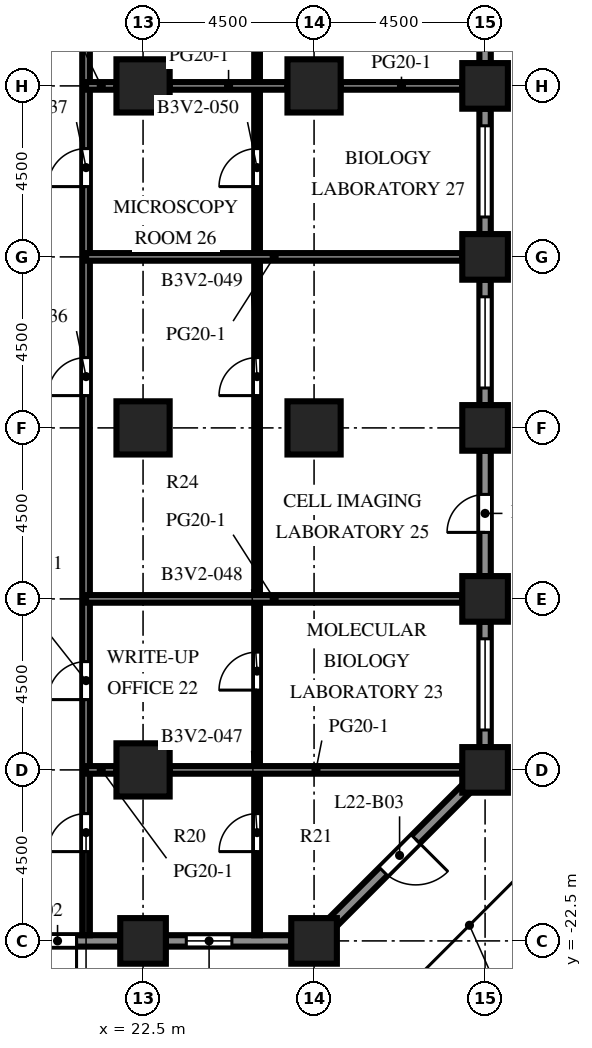
"""IFC4 building model, lengths in metres.
Left out: names, types, materials, properties, quantities, classifications, styles, units other than length and angle.
Written with IfcOpenShell. Run it as: python <this file> out.ifc"""

import sys

from ifc_helpers import new_model, si_unit, direction, frame, frame_2d, origin, origin_2d, place, context, subcontext, project, spatial, rectangle, extrude, element, fill, save


model = new_model("IFC4")
c1 = context("Model", 3, precision=1e-05, world=origin(), true_north=direction((0.0, 1.0)))
c2 = subcontext(c1, "Body", "Model", "MODEL_VIEW")
j1 = project(units=[si_unit("LENGTHUNIT", "METRE"), si_unit("PLANEANGLEUNIT", "RADIAN")], contexts=[c1])
p1 = place(None, origin())
s1 = spatial("IfcSite", under=j1, at=p1, CompositionType="ELEMENT")
p2 = place(p1, origin())
s2 = spatial("IfcBuilding", under=s1, at=p2, CompositionType="ELEMENT")
p3 = place(p2, frame((0.0, 0.0, 98.4)))
s3 = spatial("IfcBuildingStorey", under=s2, at=p3, CompositionType="ELEMENT", Elevation=98.4)
for number, where, z_axis, x_axis in (
    (1, (22.5, -22.5, 0.0), (0.0, 0.0, 1.0), (1.0, 0.0, 0.0)),
    (2, (27.0, -22.5, 0.0), (0.0, 0.0, 1.0), (1.0, 0.0, 0.0)),
    (3, (31.5, -18.0, 0.0), (0.0, 0.0, 1.0), (1.0, 0.0, 0.0)),
    (4, (31.5, -13.5, 0.0), (0.0, 0.0, 1.0), (1.0, 0.0, 0.0)),
    (5, (31.5, -9.0, 0.0), (0.0, 0.0, 1.0), (1.0, 0.0, 0.0)),
    (6, (31.5, -4.5, 0.0), (0.0, 0.0, 1.0), (1.0, 0.0, 0.0)),
    (7, (31.5, 0.0, 0.0), (0.0, 0.0, 1.0), (1.0, 0.0, 0.0)),
):
    element("IfcColumn", number, at=place(p3, frame(where, z_axis=z_axis, x_axis=x_axis)), inside=s3, PredefinedType="COLUMN", context=c2, shape_type="SweptSolid", body=[
        extrude(rectangle(XDim=1.2, YDim=1.2, at=origin_2d()), origin(), (0.0, 0.0, 1.0), 4.1),
    ])
for number, where, z_axis, x_axis in (
    (8, (22.5, -18.0, 0.0), (0.0, 0.0, 1.0), (1.0, 0.0, 0.0)),
    (9, (22.5, -9.0, 0.0), (0.0, 0.0, 1.0), (1.0, 0.0, 0.0)),
    (10, (22.5, 0.0, 0.0), (0.0, 0.0, 1.0), (1.0, 0.0, 0.0)),
    (11, (27.0, -9.0, 0.0), (0.0, 0.0, 1.0), (1.0, 0.0, 0.0)),
    (12, (27.0, 0.0, 0.0), (0.0, 0.0, 1.0), (1.0, 0.0, 0.0)),
):
    element("IfcColumn", number, at=place(p3, frame(where, z_axis=z_axis, x_axis=x_axis)), inside=s3, PredefinedType="COLUMN", context=c2, shape_type="SweptSolid", body=[
        extrude(rectangle(XDim=1.4, YDim=1.4, at=origin_2d()), origin(), (0.0, 0.0, 1.0), 4.1),
    ])
p4 = place(p3, frame((21.9, -22.5, 0.0), z_axis=(0.0, 0.0, 1.0), x_axis=(-1.0, 0.0, 0.0)))
e13 = element("IfcWall", 13, at=p4, inside=s3, PredefinedType="SOLIDWALL", context=c2, shape_type="SweptSolid", body=[
    extrude(rectangle(XDim=3.3, YDim=0.3, at=frame_2d((1.65, 0.0))), origin(), (0.0, 0.0, 1.0), 2.75),
])
p5 = place(p4, frame((1.15, 0.0, 0.0)))
e14 = element("IfcOpeningElement", 14, at=p5, cuts=e13, PredefinedType="OPENING", context=c2, shape_type="SweptSolid", body=[
    extrude(rectangle(XDim=1.0, YDim=2.2, at=frame_2d((0.5, 1.1))), frame((0.0, 0.16, 0.0), z_axis=(0.0, -1.0, 0.0), x_axis=(1.0, 0.0, 0.0)), (0.0, 0.0, 1.0), 0.32),
])
p6 = place(p3, frame((26.4, -22.5, 0.0), z_axis=(0.0, 0.0, 1.0), x_axis=(-1.0, 0.0, 0.0)))
e15 = element("IfcWall", 15, at=p6, inside=s3, PredefinedType="SOLIDWALL", context=c2, shape_type="SweptSolid", body=[
    extrude(rectangle(XDim=3.3, YDim=0.3, at=frame_2d((1.65, 0.0))), origin(), (0.0, 0.0, 1.0), 2.75),
])
p7 = place(p6, frame((1.562, 0.0, 0.8)))
e16 = element("IfcOpeningElement", 16, at=p7, cuts=e15, PredefinedType="OPENING", context=c2, shape_type="SweptSolid", body=[
    extrude(rectangle(XDim=1.2, YDim=1.7, at=frame_2d((0.6, 0.85))), frame((0.0, 0.16, 0.0), z_axis=(0.0, -1.0, 0.0), x_axis=(1.0, 0.0, 0.0)), (0.0, 0.0, 1.0), 0.32),
])
p8 = place(p3, frame((31.006, -18.494, 0.0), z_axis=(0.0, 0.0, 1.0), x_axis=(-0.707106781187, -0.707106781187, 0.0)))
e17 = element("IfcWall", 17, at=p8, inside=s3, PredefinedType="SOLIDWALL", context=c2, shape_type="SweptSolid", body=[
    extrude(rectangle(XDim=4.967, YDim=0.3, at=frame_2d((2.483, 0.0))), origin(), (0.0, 0.0, 1.0), 2.75),
])
p9 = place(p8, frame((1.884, 0.0, 0.0)))
e18 = element("IfcOpeningElement", 18, at=p9, cuts=e17, PredefinedType="OPENING", context=c2, shape_type="SweptSolid", body=[
    extrude(rectangle(XDim=1.2, YDim=2.2, at=frame_2d((0.6, 1.1))), frame((0.0, 0.16, 0.0), z_axis=(0.0, -1.0, 0.0), x_axis=(1.0, 0.0, 0.0)), (0.0, 0.0, 1.0), 0.32),
])
p10 = place(p3, frame((31.5, -14.1, 0.0), z_axis=(0.0, 0.0, 1.0), x_axis=(0.0, -1.0, 0.0)))
e19 = element("IfcWall", 19, at=p10, inside=s3, PredefinedType="SOLIDWALL", context=c2, shape_type="SweptSolid", body=[
    extrude(rectangle(XDim=3.3, YDim=0.3, at=frame_2d((1.65, 0.0))), origin(), (0.0, 0.0, 1.0), 2.75),
])
p11 = place(p10, frame((0.45, 0.0, 0.8)))
e20 = element("IfcOpeningElement", 20, at=p11, cuts=e19, PredefinedType="OPENING", context=c2, shape_type="SweptSolid", body=[
    extrude(rectangle(XDim=2.4, YDim=1.7, at=frame_2d((1.2, 0.85))), frame((0.0, 0.16, 0.0), z_axis=(0.0, -1.0, 0.0), x_axis=(1.0, 0.0, 0.0)), (0.0, 0.0, 1.0), 0.32),
])
p12 = place(p3, frame((31.5, -9.6, 0.0), z_axis=(0.0, 0.0, 1.0), x_axis=(0.0, -1.0, 0.0)))
e21 = element("IfcWall", 21, at=p12, inside=s3, PredefinedType="SOLIDWALL", context=c2, shape_type="SweptSolid", body=[
    extrude(rectangle(XDim=3.3, YDim=0.3, at=frame_2d((1.65, 0.0))), origin(), (0.0, 0.0, 1.0), 2.75),
])
p13 = place(p12, frame((1.15, 0.0, 0.0)))
e22 = element("IfcOpeningElement", 22, at=p13, cuts=e21, PredefinedType="OPENING", context=c2, shape_type="SweptSolid", body=[
    extrude(rectangle(XDim=1.0, YDim=2.2, at=frame_2d((0.5, 1.1))), frame((0.0, 0.16, 0.0), z_axis=(0.0, -1.0, 0.0), x_axis=(1.0, 0.0, 0.0)), (0.0, 0.0, 1.0), 0.32),
])
p14 = place(p3, frame((31.5, -5.1, 0.0), z_axis=(0.0, 0.0, 1.0), x_axis=(0.0, -1.0, 0.0)))
e23 = element("IfcWall", 23, at=p14, inside=s3, PredefinedType="SOLIDWALL", context=c2, shape_type="SweptSolid", body=[
    extrude(rectangle(XDim=3.3, YDim=0.3, at=frame_2d((1.65, 0.0))), origin(), (0.0, 0.0, 1.0), 2.75),
])
p15 = place(p14, frame((0.45, 0.0, 0.8)))
e24 = element("IfcOpeningElement", 24, at=p15, cuts=e23, PredefinedType="OPENING", context=c2, shape_type="SweptSolid", body=[
    extrude(rectangle(XDim=2.4, YDim=1.7, at=frame_2d((1.2, 0.85))), frame((0.0, 0.16, 0.0), z_axis=(0.0, -1.0, 0.0), x_axis=(1.0, 0.0, 0.0)), (0.0, 0.0, 1.0), 0.32),
])
p16 = place(p3, frame((31.5, -0.6, 0.0), z_axis=(0.0, 0.0, 1.0), x_axis=(0.0, -1.0, 0.0)))
e25 = element("IfcWall", 25, at=p16, inside=s3, PredefinedType="SOLIDWALL", context=c2, shape_type="SweptSolid", body=[
    extrude(rectangle(XDim=3.3, YDim=0.3, at=frame_2d((1.65, 0.0))), origin(), (0.0, 0.0, 1.0), 2.75),
])
p17 = place(p16, frame((0.45, 0.0, 0.8)))
e26 = element("IfcOpeningElement", 26, at=p17, cuts=e25, PredefinedType="OPENING", context=c2, shape_type="SweptSolid", body=[
    extrude(rectangle(XDim=2.4, YDim=1.7, at=frame_2d((1.2, 0.85))), frame((0.0, 0.16, 0.0), z_axis=(0.0, -1.0, 0.0), x_axis=(1.0, 0.0, 0.0)), (0.0, 0.0, 1.0), 0.32),
])
p18 = place(p3, frame((31.5, 3.9, 0.0), z_axis=(0.0, 0.0, 1.0), x_axis=(0.0, -1.0, 0.0)))
e27 = element("IfcWall", 27, at=p18, inside=s3, PredefinedType="SOLIDWALL", context=c2, shape_type="SweptSolid", body=[
    extrude(rectangle(XDim=3.3, YDim=0.3, at=frame_2d((1.65, 0.0))), origin(), (0.0, 0.0, 1.0), 2.75),
])
p19 = place(p18, frame((0.45, 0.0, 0.8)))
e28 = element("IfcOpeningElement", 28, at=p19, cuts=e27, PredefinedType="OPENING", context=c2, shape_type="SweptSolid", body=[
    extrude(rectangle(XDim=2.4, YDim=1.7, at=frame_2d((1.2, 0.85))), frame((0.0, 0.16, 0.0), z_axis=(0.0, -1.0, 0.0), x_axis=(1.0, 0.0, 0.0)), (0.0, 0.0, 1.0), 0.32),
])
p20 = place(p3, frame((21.0, 31.35, 0.0), z_axis=(0.0, 0.0, 1.0), x_axis=(0.0, -1.0, 0.0)))
e29 = element("IfcWall", 29, at=p20, inside=s3, PredefinedType="PARTITIONING", context=c2, shape_type="SweptSolid", body=[
    extrude(rectangle(XDim=53.7, YDim=0.2, at=frame_2d((26.85, 0.0))), origin(), (0.0, 0.0, 1.0), 3.65),
])
p21 = place(p20, frame((50.5, 0.0, 0.0)))
e30 = element("IfcOpeningElement", 30, at=p21, cuts=e29, PredefinedType="OPENING", context=c2, shape_type="SweptSolid", body=[
    extrude(rectangle(XDim=1.0, YDim=2.1, at=frame_2d((0.5, 1.05))), frame((0.0, 0.11, 0.0), z_axis=(0.0, -1.0, 0.0), x_axis=(1.0, 0.0, 0.0)), (0.0, 0.0, 1.0), 0.22),
])
p22 = place(p20, frame((46.5, 0.0, 0.0)))
e31 = element("IfcOpeningElement", 31, at=p22, cuts=e29, PredefinedType="OPENING", context=c2, shape_type="SweptSolid", body=[
    extrude(rectangle(XDim=1.0, YDim=2.1, at=frame_2d((0.5, 1.05))), frame((0.0, 0.11, 0.0), z_axis=(0.0, -1.0, 0.0), x_axis=(1.0, 0.0, 0.0)), (0.0, 0.0, 1.0), 0.22),
])
p23 = place(p20, frame((38.5, 0.0, 0.0)))
e32 = element("IfcOpeningElement", 32, at=p23, cuts=e29, PredefinedType="OPENING", context=c2, shape_type="SweptSolid", body=[
    extrude(rectangle(XDim=1.0, YDim=2.1, at=frame_2d((0.5, 1.05))), frame((0.0, 0.11, 0.0), z_axis=(0.0, -1.0, 0.0), x_axis=(1.0, 0.0, 0.0)), (0.0, 0.0, 1.0), 0.22),
])
p24 = place(p20, frame((33.0, 0.0, 0.0)))
e33 = element("IfcOpeningElement", 33, at=p24, cuts=e29, PredefinedType="OPENING", context=c2, shape_type="SweptSolid", body=[
    extrude(rectangle(XDim=1.0, YDim=2.1, at=frame_2d((0.5, 1.05))), frame((0.0, 0.11, 0.0), z_axis=(0.0, -1.0, 0.0), x_axis=(1.0, 0.0, 0.0)), (0.0, 0.0, 1.0), 0.22),
])
p25 = place(p20, frame((23.5, 0.0, 0.0)))
e34 = element("IfcOpeningElement", 34, at=p25, cuts=e29, PredefinedType="OPENING", context=c2, shape_type="SweptSolid", body=[
    extrude(rectangle(XDim=1.0, YDim=2.1, at=frame_2d((0.5, 1.05))), frame((0.0, 0.11, 0.0), z_axis=(0.0, -1.0, 0.0), x_axis=(1.0, 0.0, 0.0)), (0.0, 0.0, 1.0), 0.22),
])
p26 = place(p20, frame((15.75, 0.0, 0.0)))
e35 = element("IfcOpeningElement", 35, at=p26, cuts=e29, PredefinedType="OPENING", context=c2, shape_type="SweptSolid", body=[
    extrude(rectangle(XDim=1.0, YDim=2.1, at=frame_2d((0.5, 1.05))), frame((0.0, 0.11, 0.0), z_axis=(0.0, -1.0, 0.0), x_axis=(1.0, 0.0, 0.0)), (0.0, 0.0, 1.0), 0.22),
])
p27 = place(p20, frame((7.0, 0.0, 0.0)))
e36 = element("IfcOpeningElement", 36, at=p27, cuts=e29, PredefinedType="OPENING", context=c2, shape_type="SweptSolid", body=[
    extrude(rectangle(XDim=1.0, YDim=2.1, at=frame_2d((0.5, 1.05))), frame((0.0, 0.11, 0.0), z_axis=(0.0, -1.0, 0.0), x_axis=(1.0, 0.0, 0.0)), (0.0, 0.0, 1.0), 0.22),
])
p28 = place(p20, frame((1.0, 0.0, 0.0)))
e37 = element("IfcOpeningElement", 37, at=p28, cuts=e29, PredefinedType="OPENING", context=c2, shape_type="SweptSolid", body=[
    extrude(rectangle(XDim=1.0, YDim=2.1, at=frame_2d((0.5, 1.05))), frame((0.0, 0.11, 0.0), z_axis=(0.0, -1.0, 0.0), x_axis=(1.0, 0.0, 0.0)), (0.0, 0.0, 1.0), 0.22),
])
p29 = place(p3, frame((25.5, 31.35, 0.0), z_axis=(0.0, 0.0, 1.0), x_axis=(0.0, -1.0, 0.0)))
e38 = element("IfcWall", 38, at=p29, inside=s3, PredefinedType="PARTITIONING", context=c2, shape_type="SweptSolid", body=[
    extrude(rectangle(XDim=53.7, YDim=0.15, at=frame_2d((26.85, 0.0))), origin(), (0.0, 0.0, 1.0), 3.65),
])
p30 = place(p29, frame((50.5, 0.0, 0.0)))
e39 = element("IfcOpeningElement", 39, at=p30, cuts=e38, PredefinedType="OPENING", context=c2, shape_type="SweptSolid", body=[
    extrude(rectangle(XDim=1.0, YDim=2.1, at=frame_2d((0.5, 1.05))), frame((0.0, 0.085, 0.0), z_axis=(0.0, -1.0, 0.0), x_axis=(1.0, 0.0, 0.0)), (0.0, 0.0, 1.0), 0.17),
])
p31 = place(p29, frame((46.25, 0.0, 0.0)))
e40 = element("IfcOpeningElement", 40, at=p31, cuts=e38, PredefinedType="OPENING", context=c2, shape_type="SweptSolid", body=[
    extrude(rectangle(XDim=1.0, YDim=2.1, at=frame_2d((0.5, 1.05))), frame((0.0, 0.085, 0.0), z_axis=(0.0, -1.0, 0.0), x_axis=(1.0, 0.0, 0.0)), (0.0, 0.0, 1.0), 0.17),
])
p32 = place(p29, frame((38.5, 0.0, 0.0)))
e41 = element("IfcOpeningElement", 41, at=p32, cuts=e38, PredefinedType="OPENING", context=c2, shape_type="SweptSolid", body=[
    extrude(rectangle(XDim=1.0, YDim=2.1, at=frame_2d((0.5, 1.05))), frame((0.0, 0.085, 0.0), z_axis=(0.0, -1.0, 0.0), x_axis=(1.0, 0.0, 0.0)), (0.0, 0.0, 1.0), 0.17),
])
p33 = place(p29, frame((33.0, 0.0, 0.0)))
e42 = element("IfcOpeningElement", 42, at=p33, cuts=e38, PredefinedType="OPENING", context=c2, shape_type="SweptSolid", body=[
    extrude(rectangle(XDim=1.0, YDim=2.1, at=frame_2d((0.5, 1.05))), frame((0.0, 0.085, 0.0), z_axis=(0.0, -1.0, 0.0), x_axis=(1.0, 0.0, 0.0)), (0.0, 0.0, 1.0), 0.17),
])
p34 = place(p29, frame((24.75, 0.0, 0.0)))
e43 = element("IfcOpeningElement", 43, at=p34, cuts=e38, PredefinedType="OPENING", context=c2, shape_type="SweptSolid", body=[
    extrude(rectangle(XDim=1.0, YDim=2.1, at=frame_2d((0.5, 1.05))), frame((0.0, 0.085, 0.0), z_axis=(0.0, -1.0, 0.0), x_axis=(1.0, 0.0, 0.0)), (0.0, 0.0, 1.0), 0.17),
])
p35 = place(p29, frame((15.5, 0.0, 0.0)))
e44 = element("IfcOpeningElement", 44, at=p35, cuts=e38, PredefinedType="OPENING", context=c2, shape_type="SweptSolid", body=[
    extrude(rectangle(XDim=1.0, YDim=2.1, at=frame_2d((0.5, 1.05))), frame((0.0, 0.085, 0.0), z_axis=(0.0, -1.0, 0.0), x_axis=(1.0, 0.0, 0.0)), (0.0, 0.0, 1.0), 0.17),
])
p36 = place(p29, frame((9.75, 0.0, 0.0)))
e45 = element("IfcOpeningElement", 45, at=p36, cuts=e38, PredefinedType="OPENING", context=c2, shape_type="SweptSolid", body=[
    extrude(rectangle(XDim=1.0, YDim=2.1, at=frame_2d((0.5, 1.05))), frame((0.0, 0.085, 0.0), z_axis=(0.0, -1.0, 0.0), x_axis=(1.0, 0.0, 0.0)), (0.0, 0.0, 1.0), 0.17),
])
p37 = place(p29, frame((1.5, 0.0, 0.0)))
e46 = element("IfcOpeningElement", 46, at=p37, cuts=e38, PredefinedType="OPENING", context=c2, shape_type="SweptSolid", body=[
    extrude(rectangle(XDim=1.0, YDim=2.1, at=frame_2d((0.5, 1.05))), frame((0.0, 0.085, 0.0), z_axis=(0.0, -1.0, 0.0), x_axis=(1.0, 0.0, 0.0)), (0.0, 0.0, 1.0), 0.17),
])
p38 = place(p3, frame((21.0, -18.0, 0.0), z_axis=(0.0, 0.0, 1.0), x_axis=(1.0, 0.0, 0.0)))
e47 = element("IfcWall", 47, at=p38, inside=s3, PredefinedType="PARTITIONING", context=c2, shape_type="SweptSolid", body=[
    extrude(rectangle(XDim=0.8, YDim=0.2, at=frame_2d((0.4, 0.0))), origin(), (0.0, 0.0, 1.0), 3.65),
])
p39 = place(p3, frame((23.2, -18.0, 0.0), z_axis=(0.0, 0.0, 1.0), x_axis=(1.0, 0.0, 0.0)))
e48 = element("IfcWall", 48, at=p39, inside=s3, PredefinedType="PARTITIONING", context=c2, shape_type="SweptSolid", body=[
    extrude(rectangle(XDim=7.7, YDim=0.2, at=frame_2d((3.85, 0.0))), origin(), (0.0, 0.0, 1.0), 3.65),
])
for number, where, z_axis, x_axis in (
    (49, (21.0, -13.5, 0.0), (0.0, 0.0, 1.0), (1.0, 0.0, 0.0)),
    (50, (21.0, -4.5, 0.0), (0.0, 0.0, 1.0), (1.0, 0.0, 0.0)),
):
    element("IfcWall", number, at=place(p3, frame(where, z_axis=z_axis, x_axis=x_axis)), inside=s3, PredefinedType="PARTITIONING", context=c2, shape_type="SweptSolid", body=[
        extrude(rectangle(XDim=9.9, YDim=0.2, at=frame_2d((4.95, 0.0))), origin(), (0.0, 0.0, 1.0), 3.65),
    ])
p40 = place(p3, frame((21.0, 0.0, 0.0), z_axis=(0.0, 0.0, 1.0), x_axis=(1.0, 0.0, 0.0)))
e51 = element("IfcWall", 51, at=p40, inside=s3, PredefinedType="PARTITIONING", context=c2, shape_type="SweptSolid", body=[
    extrude(rectangle(XDim=0.8, YDim=0.2, at=frame_2d((0.4, 0.0))), origin(), (0.0, 0.0, 1.0), 3.65),
])
p41 = place(p3, frame((23.2, 0.0, 0.0), z_axis=(0.0, 0.0, 1.0), x_axis=(1.0, 0.0, 0.0)))
e52 = element("IfcWall", 52, at=p41, inside=s3, PredefinedType="PARTITIONING", context=c2, shape_type="SweptSolid", body=[
    extrude(rectangle(XDim=3.1, YDim=0.2, at=frame_2d((1.55, 0.0))), origin(), (0.0, 0.0, 1.0), 3.65),
])
p42 = place(p3, frame((27.7, 0.0, 0.0), z_axis=(0.0, 0.0, 1.0), x_axis=(1.0, 0.0, 0.0)))
e53 = element("IfcWall", 53, at=p42, inside=s3, PredefinedType="PARTITIONING", context=c2, shape_type="SweptSolid", body=[
    extrude(rectangle(XDim=3.2, YDim=0.2, at=frame_2d((1.6, 0.0))), origin(), (0.0, 0.0, 1.0), 3.65),
])
p43 = place(p5, origin())
e54 = element("IfcDoor", 54, at=p43, inside=s3, OperationType="SINGLE_SWING_LEFT", PredefinedType="DOOR", context=c2, shape_type="SweptSolid", body=[
    extrude(rectangle(XDim=1.0, YDim=2.2, at=frame_2d((0.5, 1.1))), frame((0.0, 0.025, 0.0), z_axis=(0.0, -1.0, 0.0), x_axis=(1.0, 0.0, 0.0)), (0.0, 0.0, 1.0), 0.05),
])
fill(e14, e54)
p44 = place(p7, origin())
e55 = element("IfcWindow", 55, at=p44, inside=s3, PartitioningType="SINGLE_PANEL", PredefinedType="WINDOW", context=c2, shape_type="SweptSolid", body=[
    extrude(rectangle(XDim=1.2, YDim=1.7, at=frame_2d((0.6, 0.85))), frame((0.0, 0.03, 0.0), z_axis=(0.0, -1.0, 0.0), x_axis=(1.0, 0.0, 0.0)), (0.0, 0.0, 1.0), 0.06),
])
fill(e16, e55)
p45 = place(p9, origin())
e56 = element("IfcDoor", 56, at=p45, inside=s3, OperationType="SINGLE_SWING_LEFT", PredefinedType="DOOR", context=c2, shape_type="SweptSolid", body=[
    extrude(rectangle(XDim=1.2, YDim=2.2, at=frame_2d((0.6, 1.1))), frame((0.0, 0.025, 0.0), z_axis=(0.0, -1.0, 0.0), x_axis=(1.0, 0.0, 0.0)), (0.0, 0.0, 1.0), 0.05),
])
fill(e18, e56)
p46 = place(p11, origin())
e57 = element("IfcWindow", 57, at=p46, inside=s3, PartitioningType="SINGLE_PANEL", PredefinedType="WINDOW", context=c2, shape_type="SweptSolid", body=[
    extrude(rectangle(XDim=2.4, YDim=1.7, at=frame_2d((1.2, 0.85))), frame((0.0, 0.03, 0.0), z_axis=(0.0, -1.0, 0.0), x_axis=(1.0, 0.0, 0.0)), (0.0, 0.0, 1.0), 0.06),
])
fill(e20, e57)
p47 = place(p13, origin())
e58 = element("IfcDoor", 58, at=p47, inside=s3, OperationType="SINGLE_SWING_RIGHT", PredefinedType="DOOR", context=c2, shape_type="SweptSolid", body=[
    extrude(rectangle(XDim=1.0, YDim=2.2, at=frame_2d((0.5, 1.1))), frame((0.0, 0.025, 0.0), z_axis=(0.0, -1.0, 0.0), x_axis=(1.0, 0.0, 0.0)), (0.0, 0.0, 1.0), 0.05),
])
fill(e22, e58)
p48 = place(p15, origin())
e59 = element("IfcWindow", 59, at=p48, inside=s3, PartitioningType="SINGLE_PANEL", PredefinedType="WINDOW", context=c2, shape_type="SweptSolid", body=[
    extrude(rectangle(XDim=2.4, YDim=1.7, at=frame_2d((1.2, 0.85))), frame((0.0, 0.03, 0.0), z_axis=(0.0, -1.0, 0.0), x_axis=(1.0, 0.0, 0.0)), (0.0, 0.0, 1.0), 0.06),
])
fill(e24, e59)
p49 = place(p17, origin())
e60 = element("IfcWindow", 60, at=p49, inside=s3, PartitioningType="SINGLE_PANEL", PredefinedType="WINDOW", context=c2, shape_type="SweptSolid", body=[
    extrude(rectangle(XDim=2.4, YDim=1.7, at=frame_2d((1.2, 0.85))), frame((0.0, 0.03, 0.0), z_axis=(0.0, -1.0, 0.0), x_axis=(1.0, 0.0, 0.0)), (0.0, 0.0, 1.0), 0.06),
])
fill(e26, e60)
p50 = place(p21, origin())
e61 = element("IfcDoor", 61, at=p50, inside=s3, OperationType="SINGLE_SWING_RIGHT", PredefinedType="DOOR", context=c2, shape_type="SweptSolid", body=[
    extrude(rectangle(XDim=1.0, YDim=2.1, at=frame_2d((0.5, 1.05))), frame((0.0, 0.025, 0.0), z_axis=(0.0, -1.0, 0.0), x_axis=(1.0, 0.0, 0.0)), (0.0, 0.0, 1.0), 0.05),
])
fill(e30, e61)
p51 = place(p22, origin())
e62 = element("IfcDoor", 62, at=p51, inside=s3, OperationType="SINGLE_SWING_RIGHT", PredefinedType="DOOR", context=c2, shape_type="SweptSolid", body=[
    extrude(rectangle(XDim=1.0, YDim=2.1, at=frame_2d((0.5, 1.05))), frame((0.0, 0.025, 0.0), z_axis=(0.0, -1.0, 0.0), x_axis=(1.0, 0.0, 0.0)), (0.0, 0.0, 1.0), 0.05),
])
fill(e31, e62)
p52 = place(p23, origin())
e63 = element("IfcDoor", 63, at=p52, inside=s3, OperationType="SINGLE_SWING_RIGHT", PredefinedType="DOOR", context=c2, shape_type="SweptSolid", body=[
    extrude(rectangle(XDim=1.0, YDim=2.1, at=frame_2d((0.5, 1.05))), frame((0.0, 0.025, 0.0), z_axis=(0.0, -1.0, 0.0), x_axis=(1.0, 0.0, 0.0)), (0.0, 0.0, 1.0), 0.05),
])
fill(e32, e63)
p53 = place(p24, origin())
e64 = element("IfcDoor", 64, at=p53, inside=s3, OperationType="SINGLE_SWING_RIGHT", PredefinedType="DOOR", context=c2, shape_type="SweptSolid", body=[
    extrude(rectangle(XDim=1.0, YDim=2.1, at=frame_2d((0.5, 1.05))), frame((0.0, 0.025, 0.0), z_axis=(0.0, -1.0, 0.0), x_axis=(1.0, 0.0, 0.0)), (0.0, 0.0, 1.0), 0.05),
])
fill(e33, e64)
p54 = place(p30, origin())
e65 = element("IfcDoor", 65, at=p54, inside=s3, OperationType="SINGLE_SWING_RIGHT", PredefinedType="DOOR", context=c2, shape_type="SweptSolid", body=[
    extrude(rectangle(XDim=1.0, YDim=2.1, at=frame_2d((0.5, 1.05))), frame((0.0, 0.025, 0.0), z_axis=(0.0, -1.0, 0.0), x_axis=(1.0, 0.0, 0.0)), (0.0, 0.0, 1.0), 0.05),
])
fill(e39, e65)
p55 = place(p31, origin())
e66 = element("IfcDoor", 66, at=p55, inside=s3, OperationType="SINGLE_SWING_RIGHT", PredefinedType="DOOR", context=c2, shape_type="SweptSolid", body=[
    extrude(rectangle(XDim=1.0, YDim=2.1, at=frame_2d((0.5, 1.05))), frame((0.0, 0.025, 0.0), z_axis=(0.0, -1.0, 0.0), x_axis=(1.0, 0.0, 0.0)), (0.0, 0.0, 1.0), 0.05),
])
fill(e40, e66)
p56 = place(p32, origin())
e67 = element("IfcDoor", 67, at=p56, inside=s3, OperationType="SINGLE_SWING_RIGHT", PredefinedType="DOOR", context=c2, shape_type="SweptSolid", body=[
    extrude(rectangle(XDim=1.0, YDim=2.1, at=frame_2d((0.5, 1.05))), frame((0.0, 0.025, 0.0), z_axis=(0.0, -1.0, 0.0), x_axis=(1.0, 0.0, 0.0)), (0.0, 0.0, 1.0), 0.05),
])
fill(e41, e67)
p57 = place(p33, origin())
e68 = element("IfcDoor", 68, at=p57, inside=s3, OperationType="SINGLE_SWING_RIGHT", PredefinedType="DOOR", context=c2, shape_type="SweptSolid", body=[
    extrude(rectangle(XDim=1.0, YDim=2.1, at=frame_2d((0.5, 1.05))), frame((0.0, 0.025, 0.0), z_axis=(0.0, -1.0, 0.0), x_axis=(1.0, 0.0, 0.0)), (0.0, 0.0, 1.0), 0.05),
])
fill(e42, e68)
save(model, sys.argv[1])
